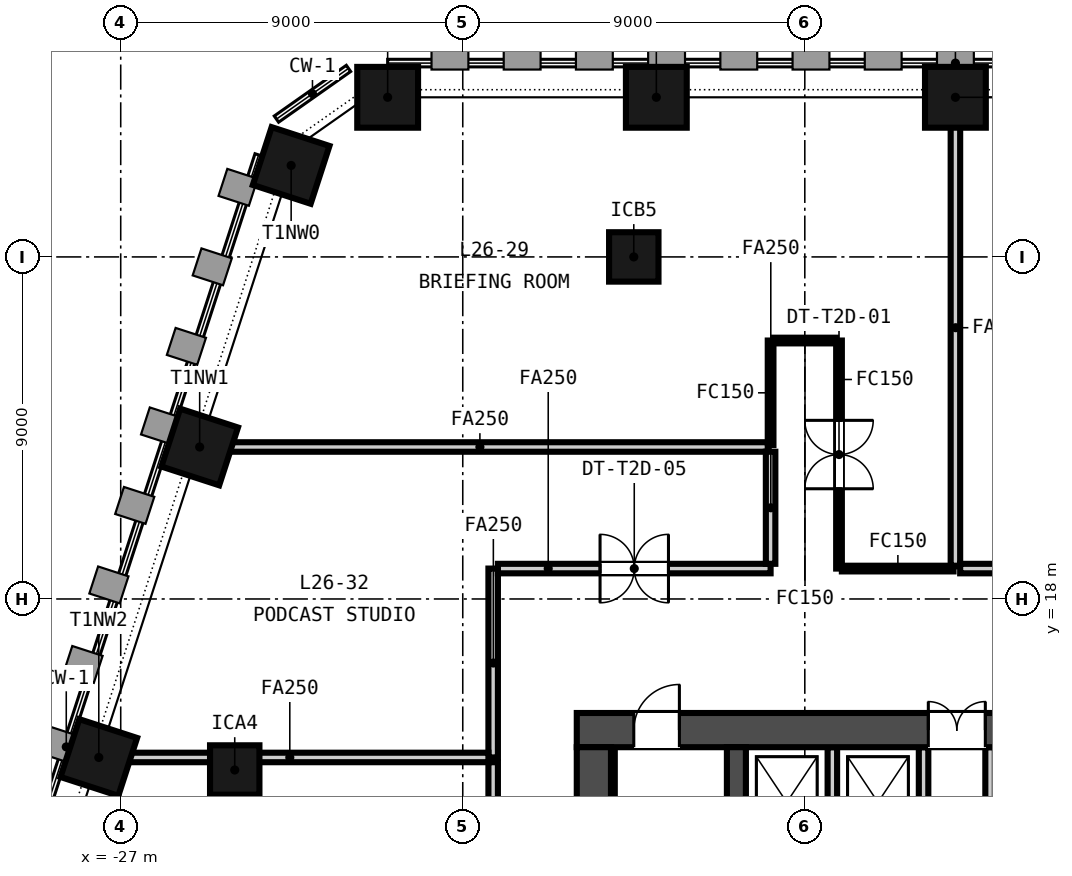
"""IFC4 building model, lengths in metres.
Left out: names, types, materials, properties, quantities, classifications, styles, units other than length and angle.
Written with IfcOpenShell. Run it as: python <this file> out.ifc"""

import sys

from ifc_helpers import new_model, si_unit, direction, frame, frame_2d, origin, origin_2d, place, context, subcontext, project, spatial, rectangle, extrude, element, fill, save


model = new_model("IFC4")
c1 = context("Model", 3, precision=1e-05, world=origin(), true_north=direction((0.0, 1.0)))
c2 = subcontext(c1, "Body", "Model", "MODEL_VIEW")
j1 = project(units=[si_unit("LENGTHUNIT", "METRE"), si_unit("PLANEANGLEUNIT", "RADIAN")], contexts=[c1])
p1 = place(None, origin())
s1 = spatial("IfcSite", under=j1, at=p1, CompositionType="ELEMENT")
p2 = place(p1, origin())
s2 = spatial("IfcBuilding", under=s1, at=p2, CompositionType="ELEMENT")
p3 = place(p2, frame((0.0, 0.0, 109.85)))
s3 = spatial("IfcBuildingStorey", under=s2, at=p3, CompositionType="ELEMENT", Elevation=109.85)
p4 = place(p3, frame((-15.0, 14.55, -0.15), z_axis=(0.0, 0.0, 1.0), x_axis=(1.0, 0.0, 0.0)))
e1 = element("IfcWall", 1, at=p4, inside=s3, PredefinedType="SOLIDWALL", context=c2, shape_type="SweptSolid", body=[
    extrude(rectangle(XDim=30.0, YDim=0.9, at=frame_2d((15.0, 0.0))), origin(), (0.0, 0.0, 1.0), 3.65),
])
p5 = place(p4, frame((9.25, 0.0, 0.15)))
e2 = element("IfcOpeningElement", 2, at=p5, cuts=e1, PredefinedType="OPENING", context=c2, shape_type="SweptSolid", body=[
    extrude(rectangle(XDim=1.5, YDim=2.1, at=frame_2d((0.75, 1.05))), frame((0.0, 0.46, 0.0), z_axis=(0.0, -1.0, 0.0), x_axis=(1.0, 0.0, 0.0)), (0.0, 0.0, 1.0), 0.92),
])
p6 = place(p4, frame((19.4, 0.0, 0.15)))
e3 = element("IfcOpeningElement", 3, at=p6, cuts=e1, PredefinedType="OPENING", context=c2, shape_type="SweptSolid", body=[
    extrude(rectangle(XDim=1.5, YDim=2.1, at=frame_2d((0.75, 1.05))), frame((0.0, 0.46, 0.0), z_axis=(0.0, -1.0, 0.0), x_axis=(1.0, 0.0, 0.0)), (0.0, 0.0, 1.0), 0.92),
])
p7 = place(p4, frame((1.5, 0.0, 0.15)))
e4 = element("IfcOpeningElement", 4, at=p7, cuts=e1, PredefinedType="OPENING", context=c2, shape_type="SweptSolid", body=[
    extrude(rectangle(XDim=1.2, YDim=2.1, at=frame_2d((0.6, 1.05))), frame((0.0, 0.46, 0.0), z_axis=(0.0, -1.0, 0.0), x_axis=(1.0, 0.0, 0.0)), (0.0, 0.0, 1.0), 0.92),
])
p8 = place(p4, frame((27.3, 0.0, 0.15)))
e5 = element("IfcOpeningElement", 5, at=p8, cuts=e1, PredefinedType="OPENING", context=c2, shape_type="SweptSolid", body=[
    extrude(rectangle(XDim=1.2, YDim=2.1, at=frame_2d((0.6, 1.05))), frame((0.0, 0.46, 0.0), z_axis=(0.0, -1.0, 0.0), x_axis=(1.0, 0.0, 0.0)), (0.0, 0.0, 1.0), 0.92),
])
p9 = place(p3, frame((-14.55, 0.9, -0.15), z_axis=(0.0, 0.0, 1.0), x_axis=(0.0, 1.0, 0.0)))
e6 = element("IfcWall", 6, at=p9, inside=s3, PredefinedType="SOLIDWALL", context=c2, shape_type="SweptSolid", body=[
    extrude(rectangle(XDim=13.2, YDim=0.9, at=frame_2d((6.6, 0.0))), origin(), (0.0, 0.0, 1.0), 3.65),
])
p10 = place(p3, frame((-10.8, 0.9, -0.15), z_axis=(0.0, 0.0, 1.0), x_axis=(0.0, 1.0, 0.0)))
e7 = element("IfcWall", 7, at=p10, inside=s3, PredefinedType="SOLIDWALL", context=c2, shape_type="SweptSolid", body=[
    extrude(rectangle(XDim=13.2, YDim=0.5, at=frame_2d((6.6, 0.0))), origin(), (0.0, 0.0, 1.0), 3.65),
])
for number, where, z_axis, x_axis in (
    (8, (-5.037, 31.2, -0.15), (0.0, 0.0, 1.0), (-1.0, 0.0, 0.0)),
    (9, (-12.907, 31.2, -0.15), (0.0, 0.0, 1.0), (-1.0, 0.0, 0.0)),
    (10, (-19.976, 31.2, -0.15), (0.0, 0.0, 1.0), (-1.0, 0.0, 0.0)),
    (11, (-22.515, 29.407, -0.15), (0.0, 0.0, 1.0), (-0.309, -0.951, 0.0)),
    (12, (-24.923, 21.999, -0.15), (0.0, 0.0, 1.0), (-0.309, -0.951, 0.0)),
    (13, (-27.577, 13.83, -0.15), (0.0, 0.0, 1.0), (-0.309, -0.951, 0.0)),
):
    element("IfcColumn", number, at=place(p3, frame(where, z_axis=z_axis, x_axis=x_axis)), inside=s3, PredefinedType="COLUMN", context=c2, shape_type="SweptSolid", body=[
        extrude(rectangle(XDim=1.6, YDim=1.6, at=origin_2d()), origin(), (0.0, 0.0, 1.0), 3.65),
    ])
for number, where, z_axis, x_axis in (
    (14, (-24.0, 13.5, -0.15), (0.0, 0.0, 1.0), (1.0, 0.0, 0.0)),
    (15, (-13.5, 27.0, -0.15), (0.0, 0.0, 1.0), (1.0, 0.0, 0.0)),
):
    element("IfcColumn", number, at=place(p3, frame(where, z_axis=z_axis, x_axis=x_axis)), inside=s3, PredefinedType="COLUMN", context=c2, shape_type="SweptSolid", body=[
        extrude(rectangle(XDim=1.3, YDim=1.3, at=origin_2d()), origin(), (0.0, 0.0, 1.0), 3.65),
    ])
for number, where, z_axis, x_axis in (
    (16, (-8.275, 11.3, 0.0), (0.0, 0.0, 1.0), (0.0, 1.0, 0.0)),
    (17, (-5.875, 11.3, 0.0), (0.0, 0.0, 1.0), (0.0, 1.0, 0.0)),
    (18, (-4.125, 11.3, 0.0), (0.0, 0.0, 1.0), (0.0, 1.0, 0.0)),
):
    element("IfcWall", number, at=place(p3, frame(where, z_axis=z_axis, x_axis=x_axis)), inside=s3, PredefinedType="PARTITIONING", context=c2, shape_type="SweptSolid", body=[
        extrude(rectangle(XDim=2.8, YDim=0.25, at=frame_2d((1.4, 0.0))), origin(), (0.0, 0.0, 1.0), 3.5),
    ])
p11 = place(p3, frame((-14.05, 0.9, 0.0), z_axis=(0.0, 0.0, 1.0), x_axis=(0.0, 1.0, 0.0)))
e19 = element("IfcWall", 19, at=p11, inside=s3, PredefinedType="SOLIDWALL", context=c2, shape_type="SweptSolid", body=[
    extrude(rectangle(XDim=13.2, YDim=0.1, at=frame_2d((6.6, 0.0))), origin(), (0.0, 0.0, 1.0), 3.5),
])
p12 = place(p3, frame((-8.1, 24.8, 0.0), z_axis=(0.0, 0.0, 1.0), x_axis=(0.0, -1.0, 0.0)))
e20 = element("IfcWall", 20, at=p12, inside=s3, PredefinedType="PARTITIONING", context=c2, shape_type="SweptSolid", body=[
    extrude(rectangle(XDim=6.0, YDim=0.15, at=frame_2d((3.0, 0.0))), origin(), (0.0, 0.0, 1.0), 2.741),
])
p13 = place(p12, frame((2.1, 0.0, 0.0)))
e21 = element("IfcOpeningElement", 21, at=p13, cuts=e20, PredefinedType="OPENING", context=c2, shape_type="SweptSolid", body=[
    extrude(rectangle(XDim=1.8, YDim=2.1, at=frame_2d((0.9, 1.05))), frame((0.0, 0.085, 0.0), z_axis=(0.0, -1.0, 0.0), x_axis=(1.0, 0.0, 0.0)), (0.0, 0.0, 1.0), 0.17),
])
p14 = place(p3, frame((-9.9, 22.049, 0.0), z_axis=(0.0, 0.0, 1.0), x_axis=(0.0, 1.0, 0.0)))
e22 = element("IfcWall", 22, at=p14, inside=s3, PredefinedType="PARTITIONING", context=c2, shape_type="SweptSolid", body=[
    extrude(rectangle(XDim=2.751, YDim=0.15, at=frame_2d((1.375, 0.0))), origin(), (0.0, 0.0, 1.0), 2.741),
])
p15 = place(p3, frame((-9.825, 24.8, 0.0), z_axis=(0.0, 0.0, 1.0), x_axis=(1.0, 0.0, 0.0)))
e23 = element("IfcWall", 23, at=p15, inside=s3, PredefinedType="PARTITIONING", context=c2, shape_type="SweptSolid", body=[
    extrude(rectangle(XDim=1.65, YDim=0.15, at=frame_2d((0.825, 0.0))), origin(), (0.0, 0.0, 1.0), 2.741),
])
p16 = place(p3, frame((-8.025, 18.8, 0.0), z_axis=(0.0, 0.0, 1.0), x_axis=(1.0, 0.0, 0.0)))
e24 = element("IfcWall", 24, at=p16, inside=s3, PredefinedType="PARTITIONING", context=c2, shape_type="SweptSolid", body=[
    extrude(rectangle(XDim=2.938, YDim=0.15, at=frame_2d((1.469, 0.0))), origin(), (0.0, 0.0, 1.0), 2.741),
])
p17 = place(p3, frame((-5.037, 18.875, 0.0), z_axis=(0.0, 0.0, 1.0), x_axis=(0.0, 1.0, 0.0)))
e25 = element("IfcWall", 25, at=p17, inside=s3, PredefinedType="PARTITIONING", context=c2, shape_type="SweptSolid", body=[
    extrude(rectangle(XDim=12.525, YDim=0.25, at=frame_2d((6.262, 0.0))), origin(), (0.0, 0.0, 1.0), 2.741),
])
p18 = place(p3, frame((-25.133, 21.999, 0.0), z_axis=(0.0, 0.0, 1.0), x_axis=(1.0, 0.0, 0.0)))
e26 = element("IfcWall", 26, at=p18, inside=s3, PredefinedType="PARTITIONING", context=c2, shape_type="SweptSolid", body=[
    extrude(rectangle(XDim=15.158, YDim=0.25, at=frame_2d((7.579, 0.0))), origin(), (0.0, 0.0, 1.0), 2.741),
])
p19 = place(p3, frame((-4.912, 18.8, 0.0), z_axis=(0.0, 0.0, 1.0), x_axis=(1.0, 0.0, 0.0)))
e27 = element("IfcWall", 27, at=p19, inside=s3, PredefinedType="PARTITIONING", context=c2, shape_type="SweptSolid", body=[
    extrude(rectangle(XDim=13.512, YDim=0.25, at=frame_2d((6.756, 0.0))), origin(), (0.0, 0.0, 1.0), 2.741),
])
p20 = place(p19, frame((5.856, 0.0, 0.0)))
e28 = element("IfcOpeningElement", 28, at=p20, cuts=e27, PredefinedType="OPENING", context=c2, shape_type="SweptSolid", body=[
    extrude(rectangle(XDim=1.8, YDim=2.1, at=frame_2d((0.9, 1.05))), frame((0.0, 0.135, 0.0), z_axis=(0.0, -1.0, 0.0), x_axis=(1.0, 0.0, 0.0)), (0.0, 0.0, 1.0), 0.27),
])
p21 = place(p3, frame((-17.2, 13.83, 0.0), z_axis=(0.0, 0.0, 1.0), x_axis=(0.0, 1.0, 0.0)))
e29 = element("IfcWall", 29, at=p21, inside=s3, PredefinedType="PARTITIONING", context=c2, shape_type="SweptSolid", body=[
    extrude(rectangle(XDim=4.97, YDim=0.25, at=frame_2d((2.485, 0.0))), origin(), (0.0, 0.0, 1.0), 2.741),
])
p22 = place(p3, frame((-17.075, 18.8, 0.0), z_axis=(0.0, 0.0, 1.0), x_axis=(1.0, 0.0, 0.0)))
e30 = element("IfcWall", 30, at=p22, inside=s3, PredefinedType="PARTITIONING", context=c2, shape_type="SweptSolid", body=[
    extrude(rectangle(XDim=7.175, YDim=0.25, at=frame_2d((3.587, 0.0))), origin(), (0.0, 0.0, 1.0), 2.741),
])
p23 = place(p22, frame((2.688, 0.0, 0.0)))
e31 = element("IfcOpeningElement", 31, at=p23, cuts=e30, PredefinedType="OPENING", context=c2, shape_type="SweptSolid", body=[
    extrude(rectangle(XDim=1.8, YDim=2.1, at=frame_2d((0.9, 1.05))), frame((0.0, 0.135, 0.0), z_axis=(0.0, -1.0, 0.0), x_axis=(1.0, 0.0, 0.0)), (0.0, 0.0, 1.0), 0.27),
])
p24 = place(p3, frame((-9.9, 18.925, 0.0), z_axis=(0.0, 0.0, 1.0), x_axis=(0.0, 1.0, 0.0)))
e32 = element("IfcWall", 32, at=p24, inside=s3, PredefinedType="PARTITIONING", context=c2, shape_type="SweptSolid", body=[
    extrude(rectangle(XDim=2.949, YDim=0.25, at=frame_2d((1.475, 0.0))), origin(), (0.0, 0.0, 1.0), 2.741),
])
p25 = place(p3, frame((-27.787, 13.83, 0.0), z_axis=(0.0, 0.0, 1.0), x_axis=(1.0, 0.0, 0.0)))
e33 = element("IfcWall", 33, at=p25, inside=s3, PredefinedType="PARTITIONING", context=c2, shape_type="SweptSolid", body=[
    extrude(rectangle(XDim=10.462, YDim=0.25, at=frame_2d((5.231, 0.0))), origin(), (0.0, 0.0, 1.0), 2.741),
])
p26 = place(p3, frame((-17.2, 4.325, 0.0), z_axis=(0.0, 0.0, 1.0), x_axis=(0.0, 1.0, 0.0)))
e34 = element("IfcWall", 34, at=p26, inside=s3, PredefinedType="PARTITIONING", context=c2, shape_type="SweptSolid", body=[
    extrude(rectangle(XDim=9.38, YDim=0.25, at=frame_2d((4.69, 0.0))), origin(), (0.0, 0.0, 1.0), 2.741),
])
p27 = place(p5, origin())
e35 = element("IfcDoor", 35, at=p27, inside=s3, OperationType="DOUBLE_DOOR_SINGLE_SWING", PredefinedType="DOOR", context=c2, shape_type="SweptSolid", body=[
    extrude(rectangle(XDim=1.5, YDim=2.1, at=frame_2d((0.75, 1.05))), frame((0.0, 0.025, 0.0), z_axis=(0.0, -1.0, 0.0), x_axis=(1.0, 0.0, 0.0)), (0.0, 0.0, 1.0), 0.05),
])
fill(e2, e35)
p28 = place(p7, origin())
e36 = element("IfcDoor", 36, at=p28, inside=s3, OperationType="SINGLE_SWING_RIGHT", PredefinedType="DOOR", context=c2, shape_type="SweptSolid", body=[
    extrude(rectangle(XDim=1.2, YDim=2.1, at=frame_2d((0.6, 1.05))), frame((0.0, 0.025, 0.0), z_axis=(0.0, -1.0, 0.0), x_axis=(1.0, 0.0, 0.0)), (0.0, 0.0, 1.0), 0.05),
])
fill(e4, e36)
p29 = place(p13, origin())
e37 = element("IfcDoor", 37, at=p29, inside=s3, OperationType="DOUBLE_DOOR_DOUBLE_SWING", PredefinedType="DOOR", context=c2, shape_type="SweptSolid", body=[
    extrude(rectangle(XDim=1.8, YDim=2.1, at=frame_2d((0.9, 1.05))), frame((0.0, 0.025, 0.0), z_axis=(0.0, -1.0, 0.0), x_axis=(1.0, 0.0, 0.0)), (0.0, 0.0, 1.0), 0.05),
])
fill(e21, e37)
p30 = place(p23, origin())
e38 = element("IfcDoor", 38, at=p30, inside=s3, OperationType="DOUBLE_DOOR_DOUBLE_SWING", PredefinedType="DOOR", context=c2, shape_type="SweptSolid", body=[
    extrude(rectangle(XDim=1.8, YDim=2.1, at=frame_2d((0.9, 1.05))), frame((0.0, 0.025, 0.0), z_axis=(0.0, -1.0, 0.0), x_axis=(1.0, 0.0, 0.0)), (0.0, 0.0, 1.0), 0.05),
])
fill(e31, e38)
save(model, sys.argv[1])
